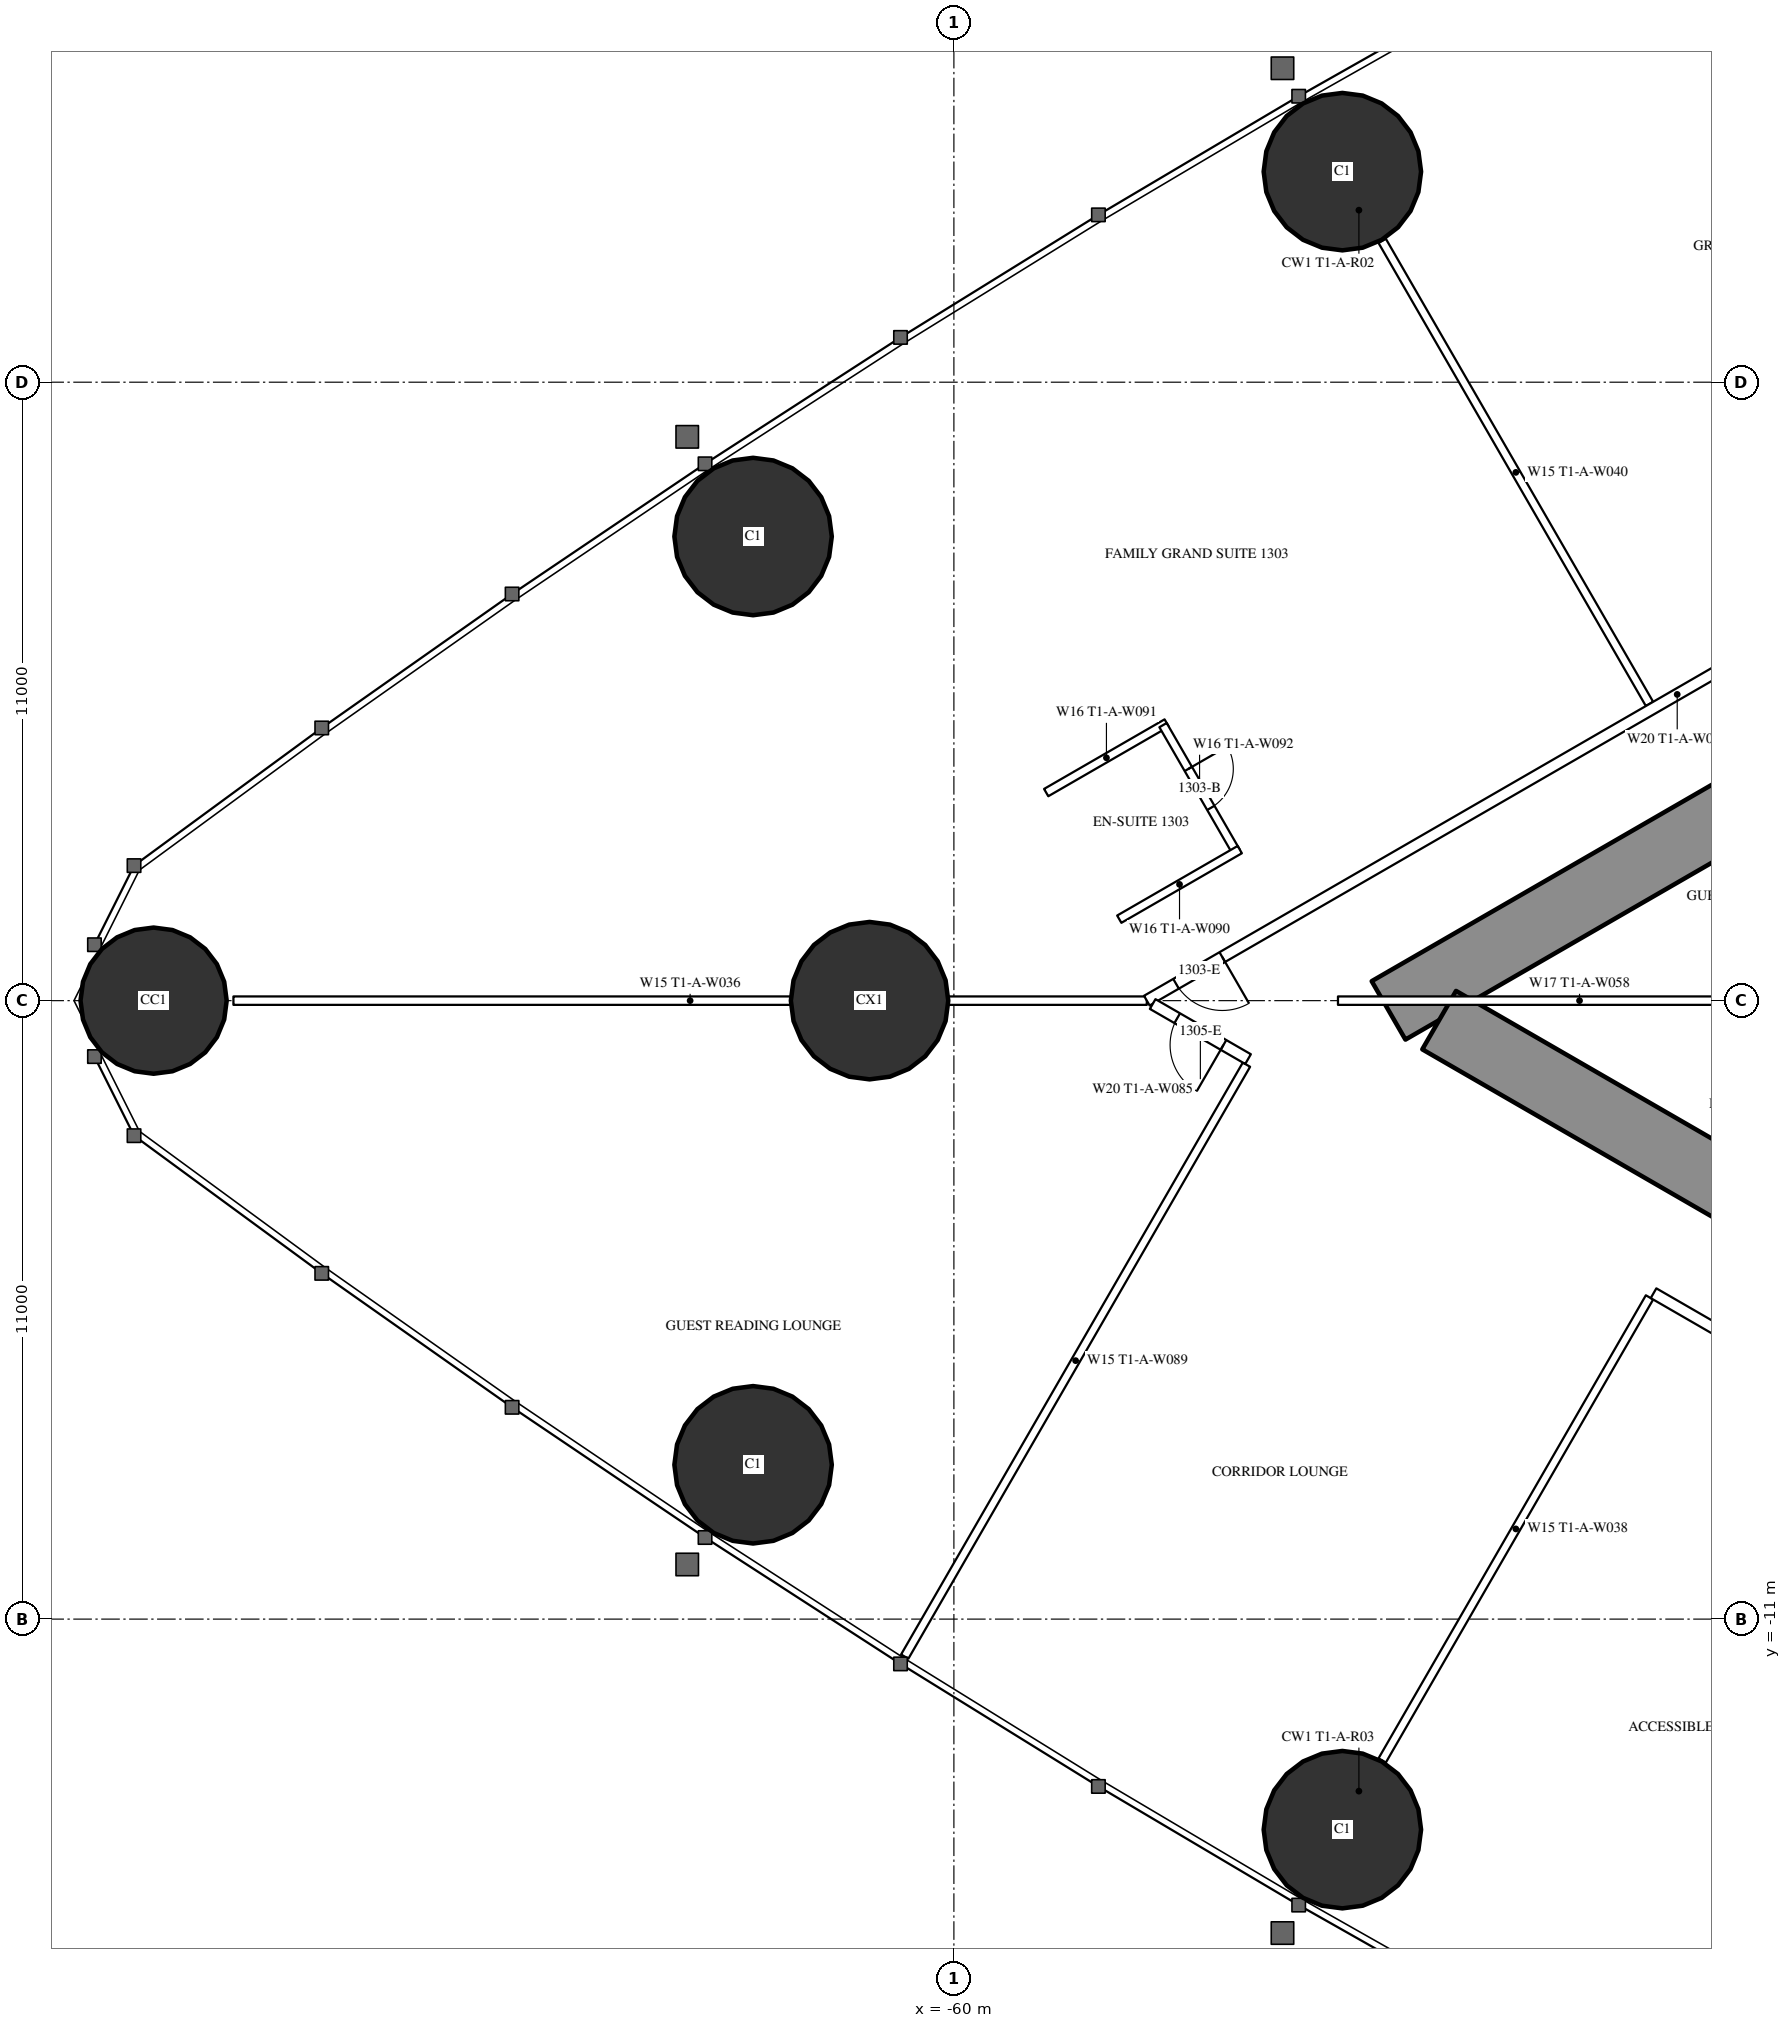
"""IFC4 building model, lengths in metres.
Left out: names, types, materials, properties, quantities, classifications, styles, units other than length and angle.
Written with IfcOpenShell. Run it as: python <this file> out.ifc"""

import sys

from ifc_helpers import new_model, si_unit, direction, frame, frame_2d, origin, origin_2d, place, context, subcontext, project, spatial, rectangle, hollow_circle, extrude, element, fill, save


model = new_model("IFC4")
c1 = context("Model", 3, precision=1e-05, world=origin(), true_north=direction((0.0, 1.0)))
c2 = subcontext(c1, "Body", "Model", "MODEL_VIEW")
j1 = project(units=[si_unit("LENGTHUNIT", "METRE"), si_unit("PLANEANGLEUNIT", "RADIAN")], contexts=[c1])
p1 = place(None, origin())
s1 = spatial("IfcSite", under=j1, at=p1, CompositionType="ELEMENT")
p2 = place(p1, origin())
s2 = spatial("IfcBuilding", under=s1, at=p2, CompositionType="ELEMENT")
p3 = place(p2, frame((0.0, 0.0, 53.0)))
s3 = spatial("IfcBuildingStorey", under=s2, at=p3, CompositionType="ELEMENT", Elevation=53.0)
p4 = place(p3, frame((-74.235, 0.0, 0.0), z_axis=(0.0, 0.0, 1.0), x_axis=(1.0, 0.0, 0.0)))
e1 = element("IfcColumn", 1, at=p4, inside=s3, PredefinedType="COLUMN", context=c2, shape_type="SweptSolid", body=[
    extrude(hollow_circle(Radius=1.3, WallThickness=0.1, at=origin_2d()), origin(), (0.0, 0.0, 1.0), 3.5),
])
for number, where, z_axis, x_axis in (
    (2, (-63.572, -8.255, 0.0), (0.0, 0.0, 1.0), (1.0, 0.0, 0.0)),
    (3, (-53.09, -14.745, 0.0), (0.0, 0.0, 1.0), (1.0, 0.0, 0.0)),
    (4, (-53.09, 14.745, 0.0), (0.0, 0.0, 1.0), (1.0, 0.0, 0.0)),
    (5, (-63.572, 8.255, 0.0), (0.0, 0.0, 1.0), (1.0, 0.0, 0.0)),
):
    element("IfcColumn", number, at=place(p3, frame(where, z_axis=z_axis, x_axis=x_axis)), inside=s3, PredefinedType="COLUMN", context=c2, shape_type="SweptSolid", body=[
        extrude(hollow_circle(Radius=1.4, WallThickness=0.12, at=origin_2d()), origin(), (0.0, 0.0, 1.0), 3.5),
    ])
p5 = place(p3, frame((-61.5, 0.0, 0.0), z_axis=(0.0, 0.0, 1.0), x_axis=(1.0, 0.0, 0.0)))
e6 = element("IfcColumn", 6, at=p5, inside=s3, PredefinedType="COLUMN", context=c2, shape_type="SweptSolid", body=[
    extrude(hollow_circle(Radius=1.4, WallThickness=0.1, at=origin_2d()), origin(), (0.0, 0.0, 1.0), 3.5),
])
p6 = place(p3, frame((-27.2, 14.3, 0.0), z_axis=(0.0, 0.0, 1.0), x_axis=(-0.866026593062, -0.499997940104, 0.0)))
e7 = element("IfcWall", 7, at=p6, inside=s3, PredefinedType="SHEAR", context=c2, shape_type="SweptSolid", body=[
    extrude(rectangle(XDim=28.946, YDim=1.2, at=frame_2d((14.473, 0.0))), origin(), (0.0, 0.0, 1.0), 3.5),
])
p7 = place(p6, frame((4.6, 0.0, 0.0)))
e8 = element("IfcOpeningElement", 8, at=p7, cuts=e7, PredefinedType="OPENING", context=c2, shape_type="SweptSolid", body=[
    extrude(rectangle(XDim=1.0, YDim=2.2, at=frame_2d((0.5, 1.1))), frame((0.0, 0.61, 0.0), z_axis=(0.0, -1.0, 0.0), x_axis=(1.0, 0.0, 0.0)), (0.0, 0.0, 1.0), 1.22),
])
p8 = place(p6, frame((13.395, 0.0, 0.0)))
e9 = element("IfcOpeningElement", 9, at=p8, cuts=e7, PredefinedType="OPENING", context=c2, shape_type="SweptSolid", body=[
    extrude(rectangle(XDim=1.8, YDim=2.2, at=frame_2d((0.9, 1.1))), frame((0.0, 0.61, 0.0), z_axis=(0.0, -1.0, 0.0), x_axis=(1.0, 0.0, 0.0)), (0.0, 0.0, 1.0), 1.22),
])
p9 = place(p3, frame((-27.2, -14.3, 0.0), z_axis=(0.0, 0.0, 1.0), x_axis=(-0.866024021859, 0.500002393557, 0.0)))
e10 = element("IfcWall", 10, at=p9, inside=s3, PredefinedType="SHEAR", context=c2, shape_type="SweptSolid", body=[
    extrude(rectangle(XDim=27.907, YDim=1.2, at=frame_2d((13.954, 0.0))), origin(), (0.0, 0.0, 1.0), 3.5),
])
p10 = place(p9, frame((4.6, 0.0, 0.0)))
e11 = element("IfcOpeningElement", 11, at=p10, cuts=e10, PredefinedType="OPENING", context=c2, shape_type="SweptSolid", body=[
    extrude(rectangle(XDim=1.0, YDim=2.2, at=frame_2d((0.5, 1.1))), frame((0.0, 0.61, 0.0), z_axis=(0.0, -1.0, 0.0), x_axis=(1.0, 0.0, 0.0)), (0.0, 0.0, 1.0), 1.22),
])
p11 = place(p9, frame((13.395, 0.0, 0.0)))
e12 = element("IfcOpeningElement", 12, at=p11, cuts=e10, PredefinedType="OPENING", context=c2, shape_type="SweptSolid", body=[
    extrude(rectangle(XDim=1.8, YDim=2.2, at=frame_2d((0.9, 1.1))), frame((0.0, 0.61, 0.0), z_axis=(0.0, -1.0, 0.0), x_axis=(1.0, 0.0, 0.0)), (0.0, 0.0, 1.0), 1.22),
])
for number, where, z_axis, x_axis in (
    (13, (-47.627, 5.278, 0.0), (0.0, 0.0, 1.0), (-0.5, 0.866, 0.0)),
    (14, (-47.627, -5.278, 0.0), (0.0, 0.0, 1.0), (-0.5, -0.866, 0.0)),
):
    element("IfcWall", number, at=place(p3, frame(where, z_axis=z_axis, x_axis=x_axis)), inside=s3, PredefinedType="PARTITIONING", context=c2, shape_type="SweptSolid", body=[
        extrude(rectangle(XDim=9.51, YDim=0.15, at=frame_2d((4.755, 0.0))), origin(), (0.0, 0.0, 1.0), 2.25),
    ])
p12 = place(p3, frame((-54.796, -1.139, 0.0), z_axis=(0.0, 0.0, 1.0), x_axis=(-0.499998860433, -0.866026061713, 0.0)))
e15 = element("IfcWall", 15, at=p12, inside=s3, PredefinedType="PARTITIONING", context=c2, shape_type="SweptSolid", body=[
    extrude(rectangle(XDim=12.157, YDim=0.15, at=frame_2d((6.078, 0.0))), origin(), (0.0, 0.0, 1.0), 3.25),
])
p13 = place(p3, frame((-56.568, 0.0, 0.0), z_axis=(0.0, 0.0, 1.0), x_axis=(-1.0, 0.0, 0.0)))
e16 = element("IfcWall", 16, at=p13, inside=s3, PredefinedType="PARTITIONING", context=c2, shape_type="SweptSolid", body=[
    extrude(rectangle(XDim=16.247, YDim=0.15, at=frame_2d((8.124, 0.0))), origin(), (0.0, 0.0, 1.0), 2.25),
])
p14 = place(p3, frame((-37.7, 10.894, 0.0), z_axis=(0.0, 0.0, 1.0), x_axis=(-0.866027905338, -0.499995667157, 0.0)))
e17 = element("IfcWall", 17, at=p14, inside=s3, PredefinedType="PARTITIONING", context=c2, shape_type="SweptSolid", body=[
    extrude(rectangle(XDim=21.787, YDim=0.2, at=frame_2d((10.894, 0.0))), origin(), (0.0, 0.0, 1.0), 3.25),
])
p15 = place(p14, frame((20.237, 0.0, 0.0)))
e18 = element("IfcOpeningElement", 18, at=p15, cuts=e17, PredefinedType="OPENING", context=c2, shape_type="SweptSolid", body=[
    extrude(rectangle(XDim=0.95, YDim=2.2, at=frame_2d((0.475, 1.1))), frame((0.0, 0.11, 0.0), z_axis=(0.0, -1.0, 0.0), x_axis=(1.0, 0.0, 0.0)), (0.0, 0.0, 1.0), 0.22),
])
p16 = place(p14, frame((2.95, 0.0, 0.0)))
e19 = element("IfcOpeningElement", 19, at=p16, cuts=e17, PredefinedType="OPENING", context=c2, shape_type="SweptSolid", body=[
    extrude(rectangle(XDim=0.95, YDim=2.2, at=frame_2d((0.475, 1.1))), frame((0.0, 0.11, 0.0), z_axis=(0.0, -1.0, 0.0), x_axis=(1.0, 0.0, 0.0)), (0.0, 0.0, 1.0), 0.22),
])
p17 = place(p3, frame((-36.92, -11.344, 0.0), z_axis=(0.0, 0.0, 1.0), x_axis=(-0.866025017052, 0.500000669839, 0.0)))
e20 = element("IfcWall", 20, at=p17, inside=s3, PredefinedType="PARTITIONING", context=c2, shape_type="SweptSolid", body=[
    extrude(rectangle(XDim=12.28, YDim=0.2, at=frame_2d((6.14, 0.0))), origin(), (0.0, 0.0, 1.0), 3.25),
])
p18 = place(p17, frame((3.35, 0.0, 0.0)))
e21 = element("IfcOpeningElement", 21, at=p18, cuts=e20, PredefinedType="OPENING", context=c2, shape_type="SweptSolid", body=[
    extrude(rectangle(XDim=1.0, YDim=2.2, at=frame_2d((0.5, 1.1))), frame((0.0, 0.11, 0.0), z_axis=(0.0, -1.0, 0.0), x_axis=(1.0, 0.0, 0.0)), (0.0, 0.0, 1.0), 0.22),
])
p19 = place(p3, frame((-54.768, -1.04, 0.0), z_axis=(0.0, 0.0, 1.0), x_axis=(-0.866056934013, 0.499945384066, 0.0)))
e22 = element("IfcWall", 22, at=p19, inside=s3, PredefinedType="PARTITIONING", context=c2, shape_type="SweptSolid", body=[
    extrude(rectangle(XDim=1.959, YDim=0.2, at=frame_2d((0.979, 0.0))), origin(), (0.0, 0.0, 1.0), 3.25),
])
p20 = place(p19, frame((0.505, 0.0, 0.0)))
e23 = element("IfcOpeningElement", 23, at=p20, cuts=e22, PredefinedType="OPENING", context=c2, shape_type="SweptSolid", body=[
    extrude(rectangle(XDim=0.95, YDim=2.2, at=frame_2d((0.475, 1.1))), frame((0.0, 0.11, 0.0), z_axis=(0.0, -1.0, 0.0), x_axis=(1.0, 0.0, 0.0)), (0.0, 0.0, 1.0), 0.22),
])
p21 = place(p3, frame((-56.215, 4.938, 0.0), z_axis=(0.0, 0.0, 1.0), x_axis=(-0.866006523861, -0.500032699561, 0.0)))
e24 = element("IfcWall", 24, at=p21, inside=s3, PredefinedType="PARTITIONING", context=c2, shape_type="SweptSolid", body=[
    extrude(rectangle(XDim=2.475, YDim=0.15, at=frame_2d((1.237, 0.0))), origin(), (0.0, 0.0, 1.0), 3.25),
])
p22 = place(p3, frame((-54.98, 2.649, 0.0), z_axis=(0.0, 0.0, 1.0), x_axis=(-0.500006934395, 0.866021400173, 0.0)))
e25 = element("IfcWall", 25, at=p22, inside=s3, PredefinedType="PARTITIONING", context=c2, shape_type="SweptSolid", body=[
    extrude(rectangle(XDim=2.6, YDim=0.15, at=frame_2d((1.3, 0.0))), origin(), (0.0, 0.0, 1.0), 3.25),
])
p23 = place(p22, frame((0.9, 0.0, 0.0)))
e26 = element("IfcOpeningElement", 26, at=p23, cuts=e25, PredefinedType="OPENING", context=c2, shape_type="SweptSolid", body=[
    extrude(rectangle(XDim=0.8, YDim=2.2, at=frame_2d((0.4, 1.1))), frame((0.0, 0.085, 0.0), z_axis=(0.0, -1.0, 0.0), x_axis=(1.0, 0.0, 0.0)), (0.0, 0.0, 1.0), 0.17),
])
p24 = place(p3, frame((-54.915, 2.687, 0.0), z_axis=(0.0, 0.0, 1.0), x_axis=(-0.866006523861, -0.500032699561, 0.0)))
e27 = element("IfcWall", 27, at=p24, inside=s3, PredefinedType="PARTITIONING", context=c2, shape_type="SweptSolid", body=[
    extrude(rectangle(XDim=2.475, YDim=0.15, at=frame_2d((1.237, 0.0))), origin(), (0.0, 0.0, 1.0), 3.25),
])
p25 = place(p3, frame((-44.575, 0.0, 0.0), z_axis=(0.0, 0.0, 1.0), x_axis=(-1.0, 0.0, 0.0)))
e28 = element("IfcWall", 28, at=p25, inside=s3, PredefinedType="PARTITIONING", context=c2, shape_type="SweptSolid", body=[
    extrude(rectangle(XDim=8.593, YDim=0.15, at=frame_2d((4.297, 0.0))), origin(), (0.0, 0.0, 1.0), 2.25),
])
p26 = place(p23, origin())
e29 = element("IfcDoor", 29, at=p26, inside=s3, OperationType="SINGLE_SWING_RIGHT", PredefinedType="DOOR", context=c2, shape_type="SweptSolid", body=[
    extrude(rectangle(XDim=0.8, YDim=2.2, at=frame_2d((0.4, 1.1))), frame((0.0, 0.025, 0.0), z_axis=(0.0, -1.0, 0.0), x_axis=(1.0, 0.0, 0.0)), (0.0, 0.0, 1.0), 0.05),
])
fill(e26, e29)
p27 = place(p15, origin())
e30 = element("IfcDoor", 30, at=p27, inside=s3, OperationType="SINGLE_SWING_LEFT", PredefinedType="DOOR", context=c2, shape_type="SweptSolid", body=[
    extrude(rectangle(XDim=0.95, YDim=2.2, at=frame_2d((0.475, 1.1))), frame((0.0, 0.025, 0.0), z_axis=(0.0, -1.0, 0.0), x_axis=(1.0, 0.0, 0.0)), (0.0, 0.0, 1.0), 0.05),
])
fill(e18, e30)
p28 = place(p20, origin())
e31 = element("IfcDoor", 31, at=p28, inside=s3, OperationType="SINGLE_SWING_LEFT", PredefinedType="DOOR", context=c2, shape_type="SweptSolid", body=[
    extrude(rectangle(XDim=0.95, YDim=2.2, at=frame_2d((0.475, 1.1))), frame((0.0, 0.025, 0.0), z_axis=(0.0, -1.0, 0.0), x_axis=(1.0, 0.0, 0.0)), (0.0, 0.0, 1.0), 0.05),
])
fill(e23, e31)
save(model, sys.argv[1])
